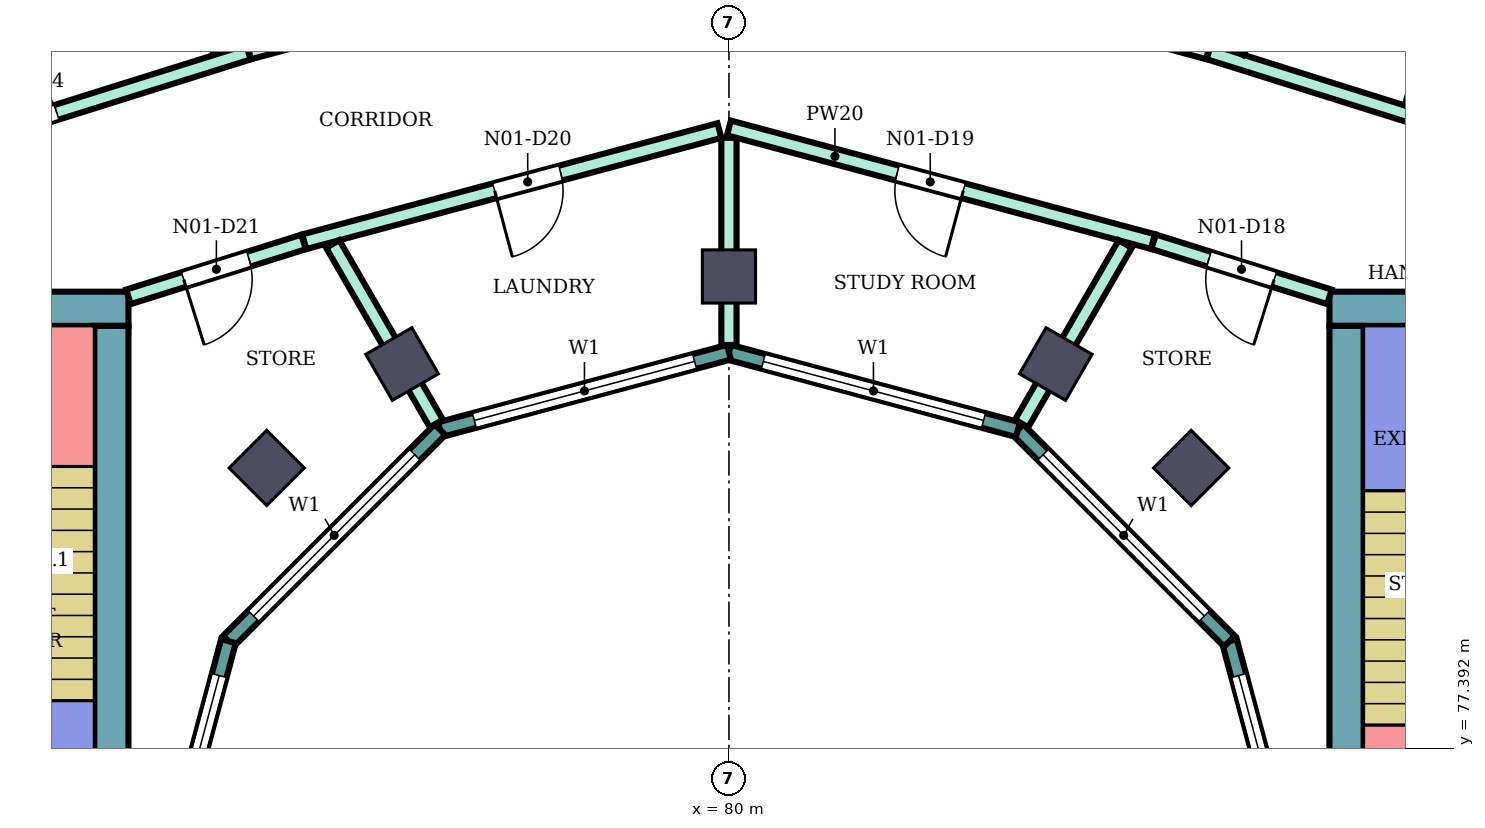
"""IFC4 building model, lengths in metres.
Left out: names, types, materials, properties, quantities, classifications, styles, units other than length and angle.
Written with IfcOpenShell. Run it as: python <this file> out.ifc"""

import sys

from ifc_helpers import new_model, si_unit, direction, frame, frame_2d, origin, origin_2d, place, context, subcontext, project, spatial, rectangle, extrude, element, fill, save


model = new_model("IFC4")
c1 = context("Model", 3, precision=1e-05, world=origin(), true_north=direction((0.0, 1.0)))
c2 = subcontext(c1, "Body", "Model", "MODEL_VIEW")
j1 = project(units=[si_unit("LENGTHUNIT", "METRE"), si_unit("PLANEANGLEUNIT", "RADIAN")], contexts=[c1])
p1 = place(None, origin())
s1 = spatial("IfcSite", under=j1, at=p1, CompositionType="ELEMENT")
p2 = place(p1, origin())
s2 = spatial("IfcBuilding", under=s1, at=p2, CompositionType="ELEMENT")
p3 = place(p2, frame((0.0, 0.0, 279.9)))
s3 = spatial("IfcBuildingStorey", under=s2, at=p3, CompositionType="ELEMENT", Elevation=279.9)
for number, where, z_axis, x_axis in (
    (1, (86.081, 81.081, 0.0), (0.0, 0.0, 1.0), (0.707, 0.707, 0.0)),
    (2, (84.3, 82.448, 0.0), (0.0, 0.0, 1.0), (0.5, 0.866, 0.0)),
    (3, (80.0, 83.6, 0.0), (0.0, 0.0, 1.0), (0.0, 1.0, 0.0)),
    (4, (75.7, 82.448, 0.0), (0.0, 0.0, 1.0), (-0.5, 0.866, 0.0)),
    (5, (73.919, 81.081, 0.0), (0.0, 0.0, 1.0), (-0.707, 0.707, 0.0)),
):
    element("IfcColumn", number, at=place(p3, frame(where, z_axis=z_axis, x_axis=x_axis)), inside=s3, PredefinedType="COLUMN", context=c2, shape_type="SweptSolid", body=[
        extrude(rectangle(XDim=0.7, YDim=0.7, at=origin_2d()), origin(), (0.0, 0.0, 1.0), 4.2),
    ])
p4 = place(p3, frame((87.9, 83.175, 0.0), z_axis=(0.0, 0.0, 1.0), x_axis=(1.0, 0.0, 0.0)))
e6 = element("IfcWall", 6, at=p4, inside=s3, PredefinedType="SHEAR", context=c2, shape_type="SweptSolid", body=[
    extrude(rectangle(XDim=13.55, YDim=0.45, at=frame_2d((6.775, 0.0))), origin(), (0.0, 0.0, 1.0), 3.88),
])
p5 = place(p4, frame((4.2, 0.0, 0.0)))
e7 = element("IfcOpeningElement", 7, at=p5, cuts=e6, PredefinedType="OPENING", context=c2, shape_type="SweptSolid", body=[
    extrude(rectangle(XDim=2.4, YDim=2.4, at=frame_2d((1.2, 1.2))), frame((0.0, 0.235, 0.0), z_axis=(0.0, -1.0, 0.0), x_axis=(1.0, 0.0, 0.0)), (0.0, 0.0, 1.0), 0.47),
])
p6 = place(p3, frame((88.125, 75.0, 0.0), z_axis=(0.0, 0.0, 1.0), x_axis=(0.0, 1.0, 0.0)))
e8 = element("IfcWall", 8, at=p6, inside=s3, PredefinedType="SHEAR", context=c2, shape_type="SweptSolid", body=[
    extrude(rectangle(XDim=7.95, YDim=0.45, at=frame_2d((3.975, 0.0))), origin(), (0.0, 0.0, 1.0), 3.88),
])
p7 = place(p3, frame((72.1, 83.175, 0.0), z_axis=(0.0, 0.0, 1.0), x_axis=(-1.0, 0.0, 0.0)))
e9 = element("IfcWall", 9, at=p7, inside=s3, PredefinedType="SHEAR", context=c2, shape_type="SweptSolid", body=[
    extrude(rectangle(XDim=13.55, YDim=0.45, at=frame_2d((6.775, 0.0))), origin(), (0.0, 0.0, 1.0), 3.88),
])
p8 = place(p7, frame((4.2, 0.0, 0.0)))
e10 = element("IfcOpeningElement", 10, at=p8, cuts=e9, PredefinedType="OPENING", context=c2, shape_type="SweptSolid", body=[
    extrude(rectangle(XDim=2.4, YDim=2.4, at=frame_2d((1.2, 1.2))), frame((0.0, 0.235, 0.0), z_axis=(0.0, -1.0, 0.0), x_axis=(1.0, 0.0, 0.0)), (0.0, 0.0, 1.0), 0.47),
])
p9 = place(p3, frame((71.875, 82.95, 0.0), z_axis=(0.0, 0.0, 1.0), x_axis=(0.0, -1.0, 0.0)))
e11 = element("IfcWall", 11, at=p9, inside=s3, PredefinedType="SHEAR", context=c2, shape_type="SweptSolid", body=[
    extrude(rectangle(XDim=7.95, YDim=0.45, at=frame_2d((3.975, 0.0))), origin(), (0.0, 0.0, 1.0), 3.88),
])
p10 = place(p3, frame((87.604, 75.0, 0.0), z_axis=(0.0, 0.0, 1.0), x_axis=(-0.258789828301, 0.965933654434, 0.0)))
e12 = element("IfcWall", 12, at=p10, inside=s3, PredefinedType="NOTDEFINED", context=c2, shape_type="SweptSolid", body=[
    extrude(rectangle(XDim=3.936, YDim=0.2, at=frame_2d((1.968, 0.0))), origin(), (0.0, 0.0, 1.0), 4.2),
])
p11 = place(p10, frame((0.468, 0.0, 0.9)))
e13 = element("IfcOpeningElement", 13, at=p11, cuts=e12, PredefinedType="OPENING", context=c2, shape_type="SweptSolid", body=[
    extrude(rectangle(XDim=3.0, YDim=2.3, at=frame_2d((1.5, 1.15))), frame((0.0, 0.11, 0.0), z_axis=(0.0, -1.0, 0.0), x_axis=(1.0, 0.0, 0.0)), (0.0, 0.0, 1.0), 0.22),
])
p12 = place(p3, frame((86.585, 78.802, 0.0), z_axis=(0.0, 0.0, 1.0), x_axis=(-0.707106781187, 0.707106781187, 0.0)))
e14 = element("IfcWall", 14, at=p12, inside=s3, PredefinedType="NOTDEFINED", context=c2, shape_type="SweptSolid", body=[
    extrude(rectangle(XDim=3.936, YDim=0.2, at=frame_2d((1.968, 0.0))), origin(), (0.0, 0.0, 1.0), 4.2),
])
p13 = place(p12, frame((0.468, 0.0, 0.9)))
e15 = element("IfcOpeningElement", 15, at=p13, cuts=e14, PredefinedType="OPENING", context=c2, shape_type="SweptSolid", body=[
    extrude(rectangle(XDim=3.0, YDim=2.3, at=frame_2d((1.5, 1.15))), frame((0.0, 0.11, 0.0), z_axis=(0.0, -1.0, 0.0), x_axis=(1.0, 0.0, 0.0)), (0.0, 0.0, 1.0), 0.22),
])
p14 = place(p3, frame((83.802, 81.585, 0.0), z_axis=(0.0, 0.0, 1.0), x_axis=(-0.965933654434, 0.258789828301, 0.0)))
e16 = element("IfcWall", 16, at=p14, inside=s3, PredefinedType="NOTDEFINED", context=c2, shape_type="SweptSolid", body=[
    extrude(rectangle(XDim=3.936, YDim=0.2, at=frame_2d((1.968, 0.0))), origin(), (0.0, 0.0, 1.0), 4.2),
])
p15 = place(p14, frame((0.468, 0.0, 0.9)))
e17 = element("IfcOpeningElement", 17, at=p15, cuts=e16, PredefinedType="OPENING", context=c2, shape_type="SweptSolid", body=[
    extrude(rectangle(XDim=3.0, YDim=2.3, at=frame_2d((1.5, 1.15))), frame((0.0, 0.11, 0.0), z_axis=(0.0, -1.0, 0.0), x_axis=(1.0, 0.0, 0.0)), (0.0, 0.0, 1.0), 0.22),
])
p16 = place(p3, frame((80.0, 82.604, 0.0), z_axis=(0.0, 0.0, 1.0), x_axis=(-0.965933654434, -0.258789828301, 0.0)))
e18 = element("IfcWall", 18, at=p16, inside=s3, PredefinedType="NOTDEFINED", context=c2, shape_type="SweptSolid", body=[
    extrude(rectangle(XDim=3.936, YDim=0.2, at=frame_2d((1.968, 0.0))), origin(), (0.0, 0.0, 1.0), 4.2),
])
p17 = place(p16, frame((0.468, 0.0, 0.9)))
e19 = element("IfcOpeningElement", 19, at=p17, cuts=e18, PredefinedType="OPENING", context=c2, shape_type="SweptSolid", body=[
    extrude(rectangle(XDim=3.0, YDim=2.3, at=frame_2d((1.5, 1.15))), frame((0.0, 0.11, 0.0), z_axis=(0.0, -1.0, 0.0), x_axis=(1.0, 0.0, 0.0)), (0.0, 0.0, 1.0), 0.22),
])
p18 = place(p3, frame((76.198, 81.585, 0.0), z_axis=(0.0, 0.0, 1.0), x_axis=(-0.707106781187, -0.707106781187, 0.0)))
e20 = element("IfcWall", 20, at=p18, inside=s3, PredefinedType="NOTDEFINED", context=c2, shape_type="SweptSolid", body=[
    extrude(rectangle(XDim=3.936, YDim=0.2, at=frame_2d((1.968, 0.0))), origin(), (0.0, 0.0, 1.0), 4.2),
])
p19 = place(p18, frame((0.468, 0.0, 0.9)))
e21 = element("IfcOpeningElement", 21, at=p19, cuts=e20, PredefinedType="OPENING", context=c2, shape_type="SweptSolid", body=[
    extrude(rectangle(XDim=3.0, YDim=2.3, at=frame_2d((1.5, 1.15))), frame((0.0, 0.11, 0.0), z_axis=(0.0, -1.0, 0.0), x_axis=(1.0, 0.0, 0.0)), (0.0, 0.0, 1.0), 0.22),
])
p20 = place(p3, frame((73.415, 78.802, 0.0), z_axis=(0.0, 0.0, 1.0), x_axis=(-0.258789828301, -0.965933654434, 0.0)))
e22 = element("IfcWall", 22, at=p20, inside=s3, PredefinedType="NOTDEFINED", context=c2, shape_type="SweptSolid", body=[
    extrude(rectangle(XDim=3.936, YDim=0.2, at=frame_2d((1.968, 0.0))), origin(), (0.0, 0.0, 1.0), 4.2),
])
p21 = place(p20, frame((0.468, 0.0, 0.9)))
e23 = element("IfcOpeningElement", 23, at=p21, cuts=e22, PredefinedType="OPENING", context=c2, shape_type="SweptSolid", body=[
    extrude(rectangle(XDim=3.0, YDim=2.3, at=frame_2d((1.5, 1.15))), frame((0.0, 0.11, 0.0), z_axis=(0.0, -1.0, 0.0), x_axis=(1.0, 0.0, 0.0)), (0.0, 0.0, 1.0), 0.22),
])
p22 = place(p3, frame((67.852, 96.042, 0.0), z_axis=(0.0, 0.0, 1.0), x_axis=(0.499960582802, -0.866048160118, 0.0)))
e24 = element("IfcWall", 24, at=p22, inside=s3, PredefinedType="PARTITIONING", context=c2, shape_type="SweptSolid", body=[
    extrude(rectangle(XDim=10.946, YDim=0.2, at=frame_2d((5.473, 0.0))), origin(), (0.0, 0.0, 1.0), 3.75),
])
p23 = place(p3, frame((68.2, 84.833, 0.0), z_axis=(0.0, 0.0, 1.0), x_axis=(0.954191968402, 0.299195065863, 0.0)))
e25 = element("IfcWall", 25, at=p23, inside=s3, PredefinedType="PARTITIONING", context=c2, shape_type="SweptSolid", body=[
    extrude(rectangle(XDim=5.74, YDim=0.2, at=frame_2d((2.87, 0.0))), origin(), (0.0, 0.0, 1.0), 3.75),
])
p24 = place(p23, frame((2.097, 0.0, 0.0)))
e26 = element("IfcOpeningElement", 26, at=p24, cuts=e25, PredefinedType="OPENING", context=c2, shape_type="SweptSolid", body=[
    extrude(rectangle(XDim=1.0, YDim=2.1, at=frame_2d((0.5, 1.05))), frame((0.0, 0.11, 0.0), z_axis=(0.0, -1.0, 0.0), x_axis=(1.0, 0.0, 0.0)), (0.0, 0.0, 1.0), 0.22),
])
p25 = place(p3, frame((72.1, 83.332, 0.0), z_axis=(0.0, 0.0, 1.0), x_axis=(0.954233106619, 0.299063836383, 0.0)))
e27 = element("IfcWall", 27, at=p25, inside=s3, PredefinedType="PARTITIONING", context=c2, shape_type="SweptSolid", body=[
    extrude(rectangle(XDim=2.414, YDim=0.2, at=frame_2d((1.207, 0.0))), origin(), (0.0, 0.0, 1.0), 3.75),
])
p26 = place(p25, frame((0.762, 0.0, 0.0)))
e28 = element("IfcOpeningElement", 28, at=p26, cuts=e27, PredefinedType="OPENING", context=c2, shape_type="SweptSolid", body=[
    extrude(rectangle(XDim=0.9, YDim=2.1, at=frame_2d((0.45, 1.05))), frame((0.0, 0.11, 0.0), z_axis=(0.0, -1.0, 0.0), x_axis=(1.0, 0.0, 0.0)), (0.0, 0.0, 1.0), 0.22),
])
p27 = place(p3, frame((73.687, 86.554, 0.0), z_axis=(0.0, 0.0, 1.0), x_axis=(0.966002126521, 0.258534120682, 0.0)))
e29 = element("IfcWall", 29, at=p27, inside=s3, PredefinedType="PARTITIONING", context=c2, shape_type="SweptSolid", body=[
    extrude(rectangle(XDim=6.486, YDim=0.2, at=frame_2d((3.243, 0.0))), origin(), (0.0, 0.0, 1.0), 3.75),
])
p28 = place(p3, frame((74.413, 84.057, 0.0), z_axis=(0.0, 0.0, 1.0), x_axis=(0.965972135939, 0.258646153246, 0.0)))
e30 = element("IfcWall", 30, at=p28, inside=s3, PredefinedType="PARTITIONING", context=c2, shape_type="SweptSolid", body=[
    extrude(rectangle(XDim=5.654, YDim=0.2, at=frame_2d((2.827, 0.0))), origin(), (0.0, 0.0, 1.0), 3.75),
])
p29 = place(p28, frame((2.593, 0.0, 0.0)))
e31 = element("IfcOpeningElement", 31, at=p29, cuts=e30, PredefinedType="OPENING", context=c2, shape_type="SweptSolid", body=[
    extrude(rectangle(XDim=0.9, YDim=2.1, at=frame_2d((0.45, 1.05))), frame((0.0, 0.11, 0.0), z_axis=(0.0, -1.0, 0.0), x_axis=(1.0, 0.0, 0.0)), (0.0, 0.0, 1.0), 0.22),
])
p30 = place(p3, frame((74.788, 84.027, 0.0), z_axis=(0.0, 0.0, 1.0), x_axis=(0.49997314572, -0.866040907555, 0.0)))
e32 = element("IfcWall", 32, at=p30, inside=s3, PredefinedType="PARTITIONING", context=c2, shape_type="SweptSolid", body=[
    extrude(rectangle(XDim=2.726, YDim=0.2, at=frame_2d((1.363, 0.0))), origin(), (0.0, 0.0, 1.0), 3.75),
])
p31 = place(p3, frame((80.0, 82.699, 0.0), z_axis=(0.0, 0.0, 1.0), x_axis=(0.0, 1.0, 0.0)))
e33 = element("IfcWall", 33, at=p31, inside=s3, PredefinedType="PARTITIONING", context=c2, shape_type="SweptSolid", body=[
    extrude(rectangle(XDim=2.725, YDim=0.2, at=frame_2d((1.363, 0.0))), origin(), (0.0, 0.0, 1.0), 3.75),
])
p32 = place(p3, frame((80.0, 85.554, 0.0), z_axis=(0.0, 0.0, 1.0), x_axis=(0.965928989968, -0.258807237802, 0.0)))
e34 = element("IfcWall", 34, at=p32, inside=s3, PredefinedType="PARTITIONING", context=c2, shape_type="SweptSolid", body=[
    extrude(rectangle(XDim=5.774, YDim=0.2, at=frame_2d((2.887, 0.0))), origin(), (0.0, 0.0, 1.0), 3.75),
])
p33 = place(p32, frame((2.292, 0.0, 0.0)))
e35 = element("IfcOpeningElement", 35, at=p33, cuts=e34, PredefinedType="OPENING", context=c2, shape_type="SweptSolid", body=[
    extrude(rectangle(XDim=0.9, YDim=2.1, at=frame_2d((0.45, 1.05))), frame((0.0, 0.11, 0.0), z_axis=(0.0, -1.0, 0.0), x_axis=(1.0, 0.0, 0.0)), (0.0, 0.0, 1.0), 0.22),
])
p34 = place(p3, frame((80.048, 88.233, 0.0), z_axis=(0.0, 0.0, 1.0), x_axis=(0.965865387308, -0.259044501198, 0.0)))
e36 = element("IfcWall", 36, at=p34, inside=s3, PredefinedType="PARTITIONING", context=c2, shape_type="SweptSolid", body=[
    extrude(rectangle(XDim=6.476, YDim=0.2, at=frame_2d((3.238, 0.0))), origin(), (0.0, 0.0, 1.0), 3.75),
])
p35 = place(p34, frame((4.936, 0.0, 0.0)))
e37 = element("IfcOpeningElement", 37, at=p35, cuts=e36, PredefinedType="OPENING", context=c2, shape_type="SweptSolid", body=[
    extrude(rectangle(XDim=1.0, YDim=2.1, at=frame_2d((0.5, 1.05))), frame((0.0, 0.11, 0.0), z_axis=(0.0, -1.0, 0.0), x_axis=(1.0, 0.0, 0.0)), (0.0, 0.0, 1.0), 0.22),
])
p36 = place(p3, frame((83.85, 81.666, 0.0), z_axis=(0.0, 0.0, 1.0), x_axis=(0.500146274735, 0.865940935554, 0.0)))
e38 = element("IfcWall", 38, at=p36, inside=s3, PredefinedType="PARTITIONING", context=c2, shape_type="SweptSolid", body=[
    extrude(rectangle(XDim=2.726, YDim=0.2, at=frame_2d((1.363, 0.0))), origin(), (0.0, 0.0, 1.0), 3.75),
])
p37 = place(p3, frame((85.587, 84.057, 0.0), z_axis=(0.0, 0.0, 1.0), x_axis=(0.954239513179, -0.299043393987, 0.0)))
e39 = element("IfcWall", 39, at=p37, inside=s3, PredefinedType="PARTITIONING", context=c2, shape_type="SweptSolid", body=[
    extrude(rectangle(XDim=2.424, YDim=0.2, at=frame_2d((1.212, 0.0))), origin(), (0.0, 0.0, 1.0), 3.75),
])
p38 = place(p37, frame((0.762, 0.0, 0.0)))
e40 = element("IfcOpeningElement", 40, at=p38, cuts=e39, PredefinedType="OPENING", context=c2, shape_type="SweptSolid", body=[
    extrude(rectangle(XDim=0.9, YDim=2.1, at=frame_2d((0.45, 1.05))), frame((0.0, 0.11, 0.0), z_axis=(0.0, -1.0, 0.0), x_axis=(1.0, 0.0, 0.0)), (0.0, 0.0, 1.0), 0.22),
])
p39 = place(p3, frame((86.313, 86.554, 0.0), z_axis=(0.0, 0.0, 1.0), x_axis=(0.954089584911, -0.299521391497, 0.0)))
e41 = element("IfcWall", 41, at=p39, inside=s3, PredefinedType="PARTITIONING", context=c2, shape_type="SweptSolid", body=[
    extrude(rectangle(XDim=5.72, YDim=0.2, at=frame_2d((2.86, 0.0))), origin(), (0.0, 0.0, 1.0), 3.75),
])
p40 = place(p3, frame((86.678, 86.562, 0.0), z_axis=(0.0, 0.0, 1.0), x_axis=(0.500133037155, 0.865948581122, 0.0)))
e42 = element("IfcWall", 42, at=p40, inside=s3, PredefinedType="PARTITIONING", context=c2, shape_type="SweptSolid", body=[
    extrude(rectangle(XDim=10.946, YDim=0.2, at=frame_2d((5.473, 0.0))), origin(), (0.0, 0.0, 1.0), 3.75),
])
p41 = place(p3, frame((88.936, 85.836, 0.0), z_axis=(0.0, 0.0, 1.0), x_axis=(0.299371771011, 0.954136543018, 0.0)))
e43 = element("IfcWall", 43, at=p41, inside=s3, PredefinedType="PARTITIONING", context=c2, shape_type="SweptSolid", body=[
    extrude(rectangle(XDim=2.75, YDim=0.1, at=frame_2d((1.375, 0.0))), origin(), (0.0, 0.0, 1.0), 3.75),
])
p42 = place(p11, origin())
e44 = element("IfcWindow", 44, at=p42, inside=s3, PartitioningType="SINGLE_PANEL", PredefinedType="WINDOW", context=c2, shape_type="SweptSolid", body=[
    extrude(rectangle(XDim=3.0, YDim=2.3, at=frame_2d((1.5, 1.15))), frame((0.0, 0.03, 0.0), z_axis=(0.0, -1.0, 0.0), x_axis=(1.0, 0.0, 0.0)), (0.0, 0.0, 1.0), 0.06),
])
fill(e13, e44)
p43 = place(p13, origin())
e45 = element("IfcWindow", 45, at=p43, inside=s3, PartitioningType="SINGLE_PANEL", PredefinedType="WINDOW", context=c2, shape_type="SweptSolid", body=[
    extrude(rectangle(XDim=3.0, YDim=2.3, at=frame_2d((1.5, 1.15))), frame((0.0, 0.03, 0.0), z_axis=(0.0, -1.0, 0.0), x_axis=(1.0, 0.0, 0.0)), (0.0, 0.0, 1.0), 0.06),
])
fill(e15, e45)
p44 = place(p15, origin())
e46 = element("IfcWindow", 46, at=p44, inside=s3, PartitioningType="SINGLE_PANEL", PredefinedType="WINDOW", context=c2, shape_type="SweptSolid", body=[
    extrude(rectangle(XDim=3.0, YDim=2.3, at=frame_2d((1.5, 1.15))), frame((0.0, 0.03, 0.0), z_axis=(0.0, -1.0, 0.0), x_axis=(1.0, 0.0, 0.0)), (0.0, 0.0, 1.0), 0.06),
])
fill(e17, e46)
p45 = place(p17, origin())
e47 = element("IfcWindow", 47, at=p45, inside=s3, PartitioningType="SINGLE_PANEL", PredefinedType="WINDOW", context=c2, shape_type="SweptSolid", body=[
    extrude(rectangle(XDim=3.0, YDim=2.3, at=frame_2d((1.5, 1.15))), frame((0.0, 0.03, 0.0), z_axis=(0.0, -1.0, 0.0), x_axis=(1.0, 0.0, 0.0)), (0.0, 0.0, 1.0), 0.06),
])
fill(e19, e47)
p46 = place(p19, origin())
e48 = element("IfcWindow", 48, at=p46, inside=s3, PartitioningType="SINGLE_PANEL", PredefinedType="WINDOW", context=c2, shape_type="SweptSolid", body=[
    extrude(rectangle(XDim=3.0, YDim=2.3, at=frame_2d((1.5, 1.15))), frame((0.0, 0.03, 0.0), z_axis=(0.0, -1.0, 0.0), x_axis=(1.0, 0.0, 0.0)), (0.0, 0.0, 1.0), 0.06),
])
fill(e21, e48)
p47 = place(p21, origin())
e49 = element("IfcWindow", 49, at=p47, inside=s3, PartitioningType="SINGLE_PANEL", PredefinedType="WINDOW", context=c2, shape_type="SweptSolid", body=[
    extrude(rectangle(XDim=3.0, YDim=2.3, at=frame_2d((1.5, 1.15))), frame((0.0, 0.03, 0.0), z_axis=(0.0, -1.0, 0.0), x_axis=(1.0, 0.0, 0.0)), (0.0, 0.0, 1.0), 0.06),
])
fill(e23, e49)
p48 = place(p24, origin())
e50 = element("IfcDoor", 50, at=p48, inside=s3, OperationType="SINGLE_SWING_LEFT", PredefinedType="DOOR", context=c2, shape_type="SweptSolid", body=[
    extrude(rectangle(XDim=1.0, YDim=2.1, at=frame_2d((0.5, 1.05))), frame((0.0, 0.025, 0.0), z_axis=(0.0, -1.0, 0.0), x_axis=(1.0, 0.0, 0.0)), (0.0, 0.0, 1.0), 0.05),
])
fill(e26, e50)
p49 = place(p38, frame((0.9, 0.0, 0.0), z_axis=(0.0, 0.0, 1.0), x_axis=(-1.0, 0.0, 0.0)))
e51 = element("IfcDoor", 51, at=p49, inside=s3, OperationType="SINGLE_SWING_LEFT", PredefinedType="DOOR", context=c2, shape_type="SweptSolid", body=[
    extrude(rectangle(XDim=0.9, YDim=2.1, at=frame_2d((0.45, 1.05))), frame((0.0, 0.025, 0.0), z_axis=(0.0, -1.0, 0.0), x_axis=(1.0, 0.0, 0.0)), (0.0, 0.0, 1.0), 0.05),
])
fill(e40, e51)
p50 = place(p33, frame((0.9, 0.0, 0.0), z_axis=(0.0, 0.0, 1.0), x_axis=(-1.0, 0.0, 0.0)))
e52 = element("IfcDoor", 52, at=p50, inside=s3, OperationType="SINGLE_SWING_LEFT", PredefinedType="DOOR", context=c2, shape_type="SweptSolid", body=[
    extrude(rectangle(XDim=0.9, YDim=2.1, at=frame_2d((0.45, 1.05))), frame((0.0, 0.025, 0.0), z_axis=(0.0, -1.0, 0.0), x_axis=(1.0, 0.0, 0.0)), (0.0, 0.0, 1.0), 0.05),
])
fill(e35, e52)
p51 = place(p29, frame((0.9, 0.0, 0.0), z_axis=(0.0, 0.0, 1.0), x_axis=(-1.0, 0.0, 0.0)))
e53 = element("IfcDoor", 53, at=p51, inside=s3, OperationType="SINGLE_SWING_RIGHT", PredefinedType="DOOR", context=c2, shape_type="SweptSolid", body=[
    extrude(rectangle(XDim=0.9, YDim=2.1, at=frame_2d((0.45, 1.05))), frame((0.0, 0.025, 0.0), z_axis=(0.0, -1.0, 0.0), x_axis=(1.0, 0.0, 0.0)), (0.0, 0.0, 1.0), 0.05),
])
fill(e31, e53)
p52 = place(p26, frame((0.9, 0.0, 0.0), z_axis=(0.0, 0.0, 1.0), x_axis=(-1.0, 0.0, 0.0)))
e54 = element("IfcDoor", 54, at=p52, inside=s3, OperationType="SINGLE_SWING_RIGHT", PredefinedType="DOOR", context=c2, shape_type="SweptSolid", body=[
    extrude(rectangle(XDim=0.9, YDim=2.1, at=frame_2d((0.45, 1.05))), frame((0.0, 0.025, 0.0), z_axis=(0.0, -1.0, 0.0), x_axis=(1.0, 0.0, 0.0)), (0.0, 0.0, 1.0), 0.05),
])
fill(e28, e54)
save(model, sys.argv[1])
